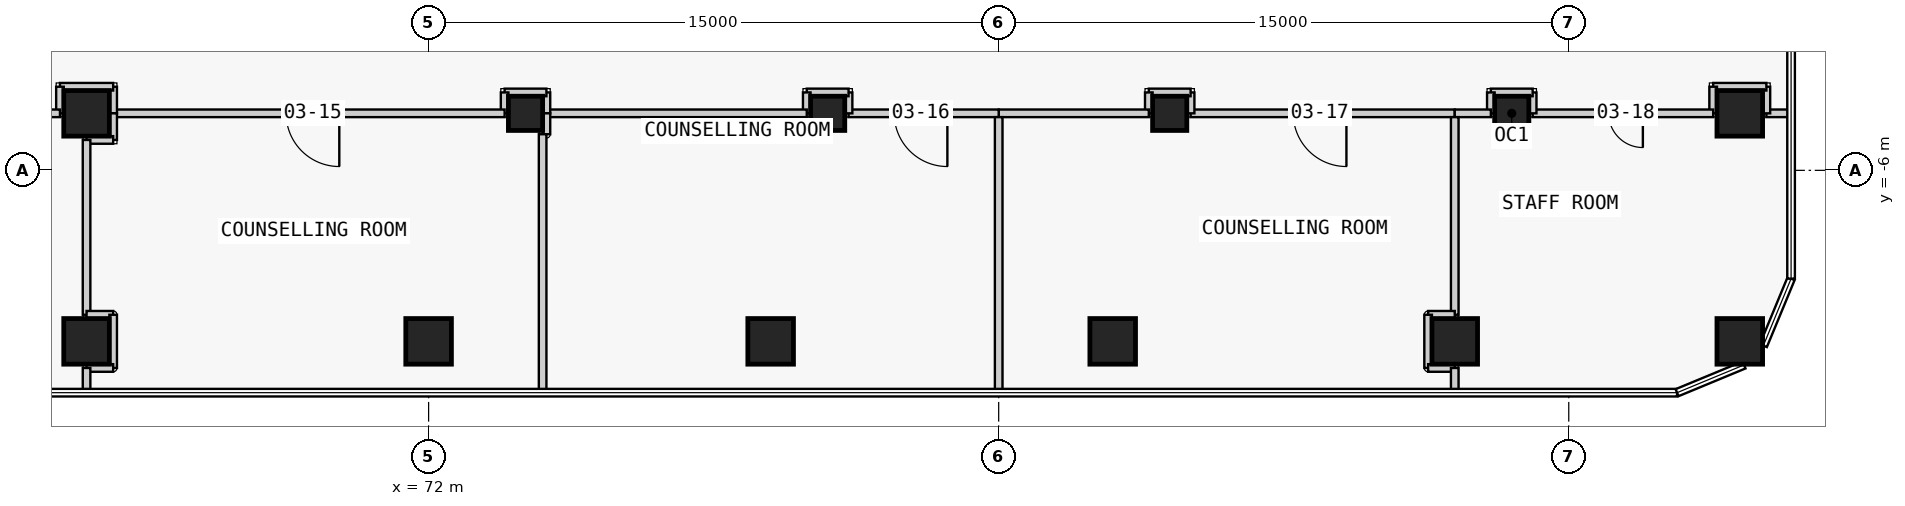
"""IFC4 building model, lengths in metres.
Left out: names, types, materials, properties, quantities, classifications, styles, units other than length and angle.
Written with IfcOpenShell. Run it as: python <this file> out.ifc"""

import sys

from ifc_helpers import new_model, si_unit, direction, frame, frame_2d, origin, origin_2d, place, context, subcontext, project, spatial, rectangle, extrude, element, fill, save


model = new_model("IFC4")
c1 = context("Model", 3, precision=1e-05, world=origin(), true_north=direction((0.0, 1.0)))
c2 = subcontext(c1, "Body", "Model", "MODEL_VIEW")
j1 = project(units=[si_unit("LENGTHUNIT", "METRE"), si_unit("PLANEANGLEUNIT", "RADIAN")], contexts=[c1])
p1 = place(None, origin())
s1 = spatial("IfcSite", under=j1, at=p1, CompositionType="ELEMENT")
p2 = place(p1, origin())
s2 = spatial("IfcBuilding", under=s1, at=p2, CompositionType="ELEMENT")
p3 = place(p2, frame((0.0, 0.0, 17.3)))
s3 = spatial("IfcBuildingStorey", under=s2, at=p3, CompositionType="ELEMENT", Elevation=17.3)
for number, where, z_axis, x_axis in (
    (1, (63.0, -10.5, 0.0), (0.0, 0.0, 1.0), (1.0, 0.0, 0.0)),
    (2, (63.0, -4.5, 0.0), (0.0, 0.0, 1.0), (1.0, 0.0, 0.0)),
    (3, (72.0, -10.5, 0.0), (0.0, 0.0, 1.0), (1.0, 0.0, 0.0)),
    (4, (81.0, -10.5, 0.0), (0.0, 0.0, 1.0), (1.0, 0.0, 0.0)),
    (5, (90.0, -10.5, 0.0), (0.0, 0.0, 1.0), (1.0, 0.0, 0.0)),
    (6, (99.0, -10.5, 0.0), (0.0, 0.0, 1.0), (1.0, 0.0, 0.0)),
    (7, (106.5, -10.5, 0.0), (0.0, 0.0, 1.0), (1.0, 0.0, 0.0)),
    (8, (106.5, -4.5, 0.0), (0.0, 0.0, 1.0), (1.0, 0.0, 0.0)),
):
    element("IfcColumn", number, at=place(p3, frame(where, z_axis=z_axis, x_axis=x_axis)), inside=s3, PredefinedType="COLUMN", context=c2, shape_type="SweptSolid", body=[
        extrude(rectangle(XDim=1.2, YDim=1.2, at=origin_2d()), origin(), (0.0, 0.0, 1.0), 4.5),
    ])
for number, where, z_axis, x_axis in (
    (9, (74.55, -4.5, 0.0), (0.0, 0.0, 1.0), (1.0, 0.0, 0.0)),
    (10, (82.5, -4.5, 0.0), (0.0, 0.0, 1.0), (1.0, 0.0, 0.0)),
    (11, (91.5, -4.5, 0.0), (0.0, 0.0, 1.0), (1.0, 0.0, 0.0)),
    (12, (100.5, -4.5, 0.0), (0.0, 0.0, 1.0), (1.0, 0.0, 0.0)),
):
    element("IfcColumn", number, at=place(p3, frame(where, z_axis=z_axis, x_axis=x_axis)), inside=s3, PredefinedType="COLUMN", context=c2, shape_type="SweptSolid", body=[
        extrude(rectangle(XDim=0.9, YDim=0.9, at=origin_2d()), origin(), (0.0, 0.0, 1.0), 4.5),
    ])
p4 = place(p3, frame((99.0, -4.5, 0.0), z_axis=(0.0, 0.0, 1.0), x_axis=(-1.0, 0.0, 0.0)))
e13 = element("IfcWall", 13, at=p4, inside=s3, PredefinedType="PARTITIONING", context=c2, shape_type="SweptSolid", body=[
    extrude(rectangle(XDim=6.95, YDim=0.2, at=frame_2d((3.475, 0.0))), origin(), (0.0, 0.0, 1.0), 4.15),
])
p5 = place(p4, frame((2.85, 0.0, 0.0)))
e14 = element("IfcOpeningElement", 14, at=p5, cuts=e13, PredefinedType="OPENING", context=c2, shape_type="SweptSolid", body=[
    extrude(rectangle(XDim=1.4, YDim=2.1, at=frame_2d((0.7, 1.05))), frame((0.0, 0.11, 0.0), z_axis=(0.0, -1.0, 0.0), x_axis=(1.0, 0.0, 0.0)), (0.0, 0.0, 1.0), 0.22),
])
p6 = place(p3, frame((92.05, -4.5, 0.0), z_axis=(0.0, 0.0, 1.0), x_axis=(0.0, 1.0, 0.0)))
e15 = element("IfcWall", 15, at=p6, inside=s3, PredefinedType="PARTITIONING", context=c2, shape_type="SweptSolid", body=[
    extrude(rectangle(XDim=0.55, YDim=0.2, at=frame_2d((0.275, 0.0))), origin(), (0.0, 0.0, 1.0), 4.15),
])
p7 = place(p3, frame((92.05, -3.95, 0.0), z_axis=(0.0, 0.0, 1.0), x_axis=(-1.0, 0.0, 0.0)))
e16 = element("IfcWall", 16, at=p7, inside=s3, PredefinedType="PARTITIONING", context=c2, shape_type="SweptSolid", body=[
    extrude(rectangle(XDim=1.1, YDim=0.2, at=frame_2d((0.55, 0.0))), origin(), (0.0, 0.0, 1.0), 4.15),
])
p8 = place(p3, frame((90.95, -3.95, 0.0), z_axis=(0.0, 0.0, 1.0), x_axis=(0.0, -1.0, 0.0)))
e17 = element("IfcWall", 17, at=p8, inside=s3, PredefinedType="PARTITIONING", context=c2, shape_type="SweptSolid", body=[
    extrude(rectangle(XDim=0.55, YDim=0.2, at=frame_2d((0.275, 0.0))), origin(), (0.0, 0.0, 1.0), 4.15),
])
p9 = place(p3, frame((90.95, -4.5, 0.0), z_axis=(0.0, 0.0, 1.0), x_axis=(-1.0, 0.0, 0.0)))
e18 = element("IfcWall", 18, at=p9, inside=s3, PredefinedType="PARTITIONING", context=c2, shape_type="SweptSolid", body=[
    extrude(rectangle(XDim=3.95, YDim=0.2, at=frame_2d((1.975, 0.0))), origin(), (0.0, 0.0, 1.0), 4.15),
])
p10 = place(p3, frame((87.0, -4.5, 0.0), z_axis=(0.0, 0.0, 1.0), x_axis=(-1.0, 0.0, 0.0)))
e19 = element("IfcWall", 19, at=p10, inside=s3, PredefinedType="PARTITIONING", context=c2, shape_type="SweptSolid", body=[
    extrude(rectangle(XDim=3.95, YDim=0.2, at=frame_2d((1.975, 0.0))), origin(), (0.0, 0.0, 1.0), 4.15),
])
p11 = place(p10, frame((1.35, 0.0, 0.0)))
e20 = element("IfcOpeningElement", 20, at=p11, cuts=e19, PredefinedType="OPENING", context=c2, shape_type="SweptSolid", body=[
    extrude(rectangle(XDim=1.4, YDim=2.1, at=frame_2d((0.7, 1.05))), frame((0.0, 0.11, 0.0), z_axis=(0.0, -1.0, 0.0), x_axis=(1.0, 0.0, 0.0)), (0.0, 0.0, 1.0), 0.22),
])
p12 = place(p3, frame((83.05, -4.5, 0.0), z_axis=(0.0, 0.0, 1.0), x_axis=(0.0, 1.0, 0.0)))
e21 = element("IfcWall", 21, at=p12, inside=s3, PredefinedType="PARTITIONING", context=c2, shape_type="SweptSolid", body=[
    extrude(rectangle(XDim=0.55, YDim=0.2, at=frame_2d((0.275, 0.0))), origin(), (0.0, 0.0, 1.0), 4.15),
])
p13 = place(p3, frame((83.05, -3.95, 0.0), z_axis=(0.0, 0.0, 1.0), x_axis=(-1.0, 0.0, 0.0)))
e22 = element("IfcWall", 22, at=p13, inside=s3, PredefinedType="PARTITIONING", context=c2, shape_type="SweptSolid", body=[
    extrude(rectangle(XDim=1.1, YDim=0.2, at=frame_2d((0.55, 0.0))), origin(), (0.0, 0.0, 1.0), 4.15),
])
p14 = place(p3, frame((81.95, -3.95, 0.0), z_axis=(0.0, 0.0, 1.0), x_axis=(0.0, -1.0, 0.0)))
e23 = element("IfcWall", 23, at=p14, inside=s3, PredefinedType="PARTITIONING", context=c2, shape_type="SweptSolid", body=[
    extrude(rectangle(XDim=0.55, YDim=0.2, at=frame_2d((0.275, 0.0))), origin(), (0.0, 0.0, 1.0), 4.15),
])
p15 = place(p3, frame((81.95, -4.5, 0.0), z_axis=(0.0, 0.0, 1.0), x_axis=(-1.0, 0.0, 0.0)))
e24 = element("IfcWall", 24, at=p15, inside=s3, PredefinedType="PARTITIONING", context=c2, shape_type="SweptSolid", body=[
    extrude(rectangle(XDim=6.85, YDim=0.2, at=frame_2d((3.425, 0.0))), origin(), (0.0, 0.0, 1.0), 4.15),
])
p16 = place(p3, frame((75.1, -4.5, 0.0), z_axis=(0.0, 0.0, 1.0), x_axis=(0.0, 1.0, 0.0)))
e25 = element("IfcWall", 25, at=p16, inside=s3, PredefinedType="PARTITIONING", context=c2, shape_type="SweptSolid", body=[
    extrude(rectangle(XDim=0.55, YDim=0.2, at=frame_2d((0.275, 0.0))), origin(), (0.0, 0.0, 1.0), 4.15),
])
p17 = place(p3, frame((75.1, -3.95, 0.0), z_axis=(0.0, 0.0, 1.0), x_axis=(-1.0, 0.0, 0.0)))
e26 = element("IfcWall", 26, at=p17, inside=s3, PredefinedType="PARTITIONING", context=c2, shape_type="SweptSolid", body=[
    extrude(rectangle(XDim=1.1, YDim=0.2, at=frame_2d((0.55, 0.0))), origin(), (0.0, 0.0, 1.0), 4.15),
])
p18 = place(p3, frame((74.0, -3.95, 0.0), z_axis=(0.0, 0.0, 1.0), x_axis=(0.0, -1.0, 0.0)))
e27 = element("IfcWall", 27, at=p18, inside=s3, PredefinedType="PARTITIONING", context=c2, shape_type="SweptSolid", body=[
    extrude(rectangle(XDim=0.55, YDim=0.2, at=frame_2d((0.275, 0.0))), origin(), (0.0, 0.0, 1.0), 4.15),
])
p19 = place(p3, frame((74.0, -4.5, 0.0), z_axis=(0.0, 0.0, 1.0), x_axis=(-1.0, 0.0, 0.0)))
e28 = element("IfcWall", 28, at=p19, inside=s3, PredefinedType="PARTITIONING", context=c2, shape_type="SweptSolid", body=[
    extrude(rectangle(XDim=10.3, YDim=0.2, at=frame_2d((5.15, 0.0))), origin(), (0.0, 0.0, 1.0), 4.15),
])
p20 = place(p19, frame((4.35, 0.0, 0.0)))
e29 = element("IfcOpeningElement", 29, at=p20, cuts=e28, PredefinedType="OPENING", context=c2, shape_type="SweptSolid", body=[
    extrude(rectangle(XDim=1.4, YDim=2.1, at=frame_2d((0.7, 1.05))), frame((0.0, 0.11, 0.0), z_axis=(0.0, -1.0, 0.0), x_axis=(1.0, 0.0, 0.0)), (0.0, 0.0, 1.0), 0.22),
])
p21 = place(p3, frame((107.85, -4.5, 0.0), z_axis=(0.0, 0.0, 1.0), x_axis=(-1.0, 0.0, 0.0)))
e30 = element("IfcWall", 30, at=p21, inside=s3, PredefinedType="PARTITIONING", context=c2, shape_type="SweptSolid", body=[
    extrude(rectangle(XDim=0.65, YDim=0.2, at=frame_2d((0.325, 0.0))), origin(), (0.0, 0.0, 1.0), 4.15),
])
p22 = place(p3, frame((107.2, -4.5, 0.0), z_axis=(0.0, 0.0, 1.0), x_axis=(0.0, 1.0, 0.0)))
e31 = element("IfcWall", 31, at=p22, inside=s3, PredefinedType="PARTITIONING", context=c2, shape_type="SweptSolid", body=[
    extrude(rectangle(XDim=0.7, YDim=0.2, at=frame_2d((0.35, 0.0))), origin(), (0.0, 0.0, 1.0), 4.15),
])
p23 = place(p3, frame((107.2, -3.8, 0.0), z_axis=(0.0, 0.0, 1.0), x_axis=(-1.0, 0.0, 0.0)))
e32 = element("IfcWall", 32, at=p23, inside=s3, PredefinedType="PARTITIONING", context=c2, shape_type="SweptSolid", body=[
    extrude(rectangle(XDim=1.4, YDim=0.2, at=frame_2d((0.7, 0.0))), origin(), (0.0, 0.0, 1.0), 4.15),
])
p24 = place(p3, frame((105.8, -3.8, 0.0), z_axis=(0.0, 0.0, 1.0), x_axis=(0.0, -1.0, 0.0)))
e33 = element("IfcWall", 33, at=p24, inside=s3, PredefinedType="PARTITIONING", context=c2, shape_type="SweptSolid", body=[
    extrude(rectangle(XDim=0.7, YDim=0.2, at=frame_2d((0.35, 0.0))), origin(), (0.0, 0.0, 1.0), 4.15),
])
p25 = place(p3, frame((105.8, -4.5, 0.0), z_axis=(0.0, 0.0, 1.0), x_axis=(-1.0, 0.0, 0.0)))
e34 = element("IfcWall", 34, at=p25, inside=s3, PredefinedType="PARTITIONING", context=c2, shape_type="SweptSolid", body=[
    extrude(rectangle(XDim=4.75, YDim=0.2, at=frame_2d((2.375, 0.0))), origin(), (0.0, 0.0, 1.0), 4.15),
])
p26 = place(p25, frame((1.85, 0.0, 0.0)))
e35 = element("IfcOpeningElement", 35, at=p26, cuts=e34, PredefinedType="OPENING", context=c2, shape_type="SweptSolid", body=[
    extrude(rectangle(XDim=0.9, YDim=2.1, at=frame_2d((0.45, 1.05))), frame((0.0, 0.11, 0.0), z_axis=(0.0, -1.0, 0.0), x_axis=(1.0, 0.0, 0.0)), (0.0, 0.0, 1.0), 0.22),
])
p27 = place(p3, frame((101.05, -4.5, 0.0), z_axis=(0.0, 0.0, 1.0), x_axis=(0.0, 1.0, 0.0)))
e36 = element("IfcWall", 36, at=p27, inside=s3, PredefinedType="PARTITIONING", context=c2, shape_type="SweptSolid", body=[
    extrude(rectangle(XDim=0.55, YDim=0.2, at=frame_2d((0.275, 0.0))), origin(), (0.0, 0.0, 1.0), 4.15),
])
p28 = place(p3, frame((101.05, -3.95, 0.0), z_axis=(0.0, 0.0, 1.0), x_axis=(-1.0, 0.0, 0.0)))
e37 = element("IfcWall", 37, at=p28, inside=s3, PredefinedType="PARTITIONING", context=c2, shape_type="SweptSolid", body=[
    extrude(rectangle(XDim=1.1, YDim=0.2, at=frame_2d((0.55, 0.0))), origin(), (0.0, 0.0, 1.0), 4.15),
])
p29 = place(p3, frame((99.95, -3.95, 0.0), z_axis=(0.0, 0.0, 1.0), x_axis=(0.0, -1.0, 0.0)))
e38 = element("IfcWall", 38, at=p29, inside=s3, PredefinedType="PARTITIONING", context=c2, shape_type="SweptSolid", body=[
    extrude(rectangle(XDim=0.55, YDim=0.2, at=frame_2d((0.275, 0.0))), origin(), (0.0, 0.0, 1.0), 4.15),
])
p30 = place(p3, frame((99.95, -4.5, 0.0), z_axis=(0.0, 0.0, 1.0), x_axis=(-1.0, 0.0, 0.0)))
e39 = element("IfcWall", 39, at=p30, inside=s3, PredefinedType="PARTITIONING", context=c2, shape_type="SweptSolid", body=[
    extrude(rectangle(XDim=0.95, YDim=0.2, at=frame_2d((0.475, 0.0))), origin(), (0.0, 0.0, 1.0), 4.15),
])
p31 = place(p3, frame((63.7, -4.5, 0.0), z_axis=(0.0, 0.0, 1.0), x_axis=(0.0, 1.0, 0.0)))
e40 = element("IfcWall", 40, at=p31, inside=s3, PredefinedType="PARTITIONING", context=c2, shape_type="SweptSolid", body=[
    extrude(rectangle(XDim=0.7, YDim=0.2, at=frame_2d((0.35, 0.0))), origin(), (0.0, 0.0, 1.0), 4.15),
])
p32 = place(p3, frame((63.7, -3.8, 0.0), z_axis=(0.0, 0.0, 1.0), x_axis=(-1.0, 0.0, 0.0)))
e41 = element("IfcWall", 41, at=p32, inside=s3, PredefinedType="PARTITIONING", context=c2, shape_type="SweptSolid", body=[
    extrude(rectangle(XDim=1.4, YDim=0.2, at=frame_2d((0.7, 0.0))), origin(), (0.0, 0.0, 1.0), 4.15),
])
p33 = place(p3, frame((62.3, -3.8, 0.0), z_axis=(0.0, 0.0, 1.0), x_axis=(0.0, -1.0, 0.0)))
e42 = element("IfcWall", 42, at=p33, inside=s3, PredefinedType="PARTITIONING", context=c2, shape_type="SweptSolid", body=[
    extrude(rectangle(XDim=0.7, YDim=0.2, at=frame_2d((0.35, 0.0))), origin(), (0.0, 0.0, 1.0), 4.15),
])
p34 = place(p3, frame((62.3, -4.5, 0.0), z_axis=(0.0, 0.0, 1.0), x_axis=(-1.0, 0.0, 0.0)))
e43 = element("IfcWall", 43, at=p34, inside=s3, PredefinedType="PARTITIONING", context=c2, shape_type="SweptSolid", body=[
    extrude(rectangle(XDim=7.6, YDim=0.2, at=frame_2d((3.8, 0.0))), origin(), (0.0, 0.0, 1.0), 4.15),
])
p35 = place(p34, frame((3.1, 0.0, 0.0)))
e44 = element("IfcOpeningElement", 44, at=p35, cuts=e43, PredefinedType="OPENING", context=c2, shape_type="SweptSolid", body=[
    extrude(rectangle(XDim=1.4, YDim=2.1, at=frame_2d((0.7, 1.05))), frame((0.0, 0.11, 0.0), z_axis=(0.0, -1.0, 0.0), x_axis=(1.0, 0.0, 0.0)), (0.0, 0.0, 1.0), 0.22),
])
for number, where, z_axis, x_axis in (
    (45, (63.7, -4.5, 0.0), (0.0, 0.0, 1.0), (0.0, -1.0, 0.0)),
    (46, (63.7, -5.2, 0.0), (0.0, 0.0, 1.0), (-1.0, 0.0, 0.0)),
):
    element("IfcWall", number, at=place(p3, frame(where, z_axis=z_axis, x_axis=x_axis)), inside=s3, PredefinedType="PARTITIONING", context=c2, shape_type="SweptSolid", body=[
        extrude(rectangle(XDim=0.7, YDim=0.2, at=frame_2d((0.35, 0.0))), origin(), (0.0, 0.0, 1.0), 4.15),
    ])
p36 = place(p3, frame((63.0, -5.2, 0.0), z_axis=(0.0, 0.0, 1.0), x_axis=(0.0, -1.0, 0.0)))
e47 = element("IfcWall", 47, at=p36, inside=s3, PredefinedType="PARTITIONING", context=c2, shape_type="SweptSolid", body=[
    extrude(rectangle(XDim=4.6, YDim=0.2, at=frame_2d((2.3, 0.0))), origin(), (0.0, 0.0, 1.0), 4.15),
])
p37 = place(p3, frame((63.0, -9.8, 0.0), z_axis=(0.0, 0.0, 1.0), x_axis=(1.0, 0.0, 0.0)))
e48 = element("IfcWall", 48, at=p37, inside=s3, PredefinedType="PARTITIONING", context=c2, shape_type="SweptSolid", body=[
    extrude(rectangle(XDim=0.7, YDim=0.2, at=frame_2d((0.35, 0.0))), origin(), (0.0, 0.0, 1.0), 4.15),
])
p38 = place(p3, frame((63.7, -9.8, 0.0), z_axis=(0.0, 0.0, 1.0), x_axis=(0.0, -1.0, 0.0)))
e49 = element("IfcWall", 49, at=p38, inside=s3, PredefinedType="PARTITIONING", context=c2, shape_type="SweptSolid", body=[
    extrude(rectangle(XDim=1.4, YDim=0.2, at=frame_2d((0.7, 0.0))), origin(), (0.0, 0.0, 1.0), 4.15),
])
p39 = place(p3, frame((63.7, -11.2, 0.0), z_axis=(0.0, 0.0, 1.0), x_axis=(-1.0, 0.0, 0.0)))
e50 = element("IfcWall", 50, at=p39, inside=s3, PredefinedType="PARTITIONING", context=c2, shape_type="SweptSolid", body=[
    extrude(rectangle(XDim=0.7, YDim=0.2, at=frame_2d((0.35, 0.0))), origin(), (0.0, 0.0, 1.0), 4.15),
])
p40 = place(p3, frame((63.0, -11.2, 0.0), z_axis=(0.0, 0.0, 1.0), x_axis=(0.0, -1.0, 0.0)))
e51 = element("IfcWall", 51, at=p40, inside=s3, PredefinedType="PARTITIONING", context=c2, shape_type="SweptSolid", body=[
    extrude(rectangle(XDim=0.65, YDim=0.2, at=frame_2d((0.325, 0.0))), origin(), (0.0, 0.0, 1.0), 4.15),
])
p41 = place(p3, frame((99.0, -4.6, 0.0), z_axis=(0.0, 0.0, 1.0), x_axis=(0.0, -1.0, 0.0)))
e52 = element("IfcWall", 52, at=p41, inside=s3, PredefinedType="PARTITIONING", context=c2, shape_type="SweptSolid", body=[
    extrude(rectangle(XDim=5.2, YDim=0.2, at=frame_2d((2.6, 0.0))), origin(), (0.0, 0.0, 1.0), 4.15),
])
p42 = place(p3, frame((99.0, -9.8, 0.0), z_axis=(0.0, 0.0, 1.0), x_axis=(-1.0, 0.0, 0.0)))
e53 = element("IfcWall", 53, at=p42, inside=s3, PredefinedType="PARTITIONING", context=c2, shape_type="SweptSolid", body=[
    extrude(rectangle(XDim=0.7, YDim=0.2, at=frame_2d((0.35, 0.0))), origin(), (0.0, 0.0, 1.0), 4.15),
])
p43 = place(p3, frame((98.3, -9.8, 0.0), z_axis=(0.0, 0.0, 1.0), x_axis=(0.0, -1.0, 0.0)))
e54 = element("IfcWall", 54, at=p43, inside=s3, PredefinedType="PARTITIONING", context=c2, shape_type="SweptSolid", body=[
    extrude(rectangle(XDim=1.4, YDim=0.2, at=frame_2d((0.7, 0.0))), origin(), (0.0, 0.0, 1.0), 4.15),
])
p44 = place(p3, frame((98.3, -11.2, 0.0), z_axis=(0.0, 0.0, 1.0), x_axis=(1.0, 0.0, 0.0)))
e55 = element("IfcWall", 55, at=p44, inside=s3, PredefinedType="PARTITIONING", context=c2, shape_type="SweptSolid", body=[
    extrude(rectangle(XDim=0.7, YDim=0.2, at=frame_2d((0.35, 0.0))), origin(), (0.0, 0.0, 1.0), 4.15),
])
p45 = place(p3, frame((99.0, -11.2, 0.0), z_axis=(0.0, 0.0, 1.0), x_axis=(0.0, -1.0, 0.0)))
e56 = element("IfcWall", 56, at=p45, inside=s3, PredefinedType="PARTITIONING", context=c2, shape_type="SweptSolid", body=[
    extrude(rectangle(XDim=0.65, YDim=0.2, at=frame_2d((0.325, 0.0))), origin(), (0.0, 0.0, 1.0), 4.15),
])
p46 = place(p3, frame((75.1, -4.5, 0.0), z_axis=(0.0, 0.0, 1.0), x_axis=(0.0, -1.0, 0.0)))
e57 = element("IfcWall", 57, at=p46, inside=s3, PredefinedType="PARTITIONING", context=c2, shape_type="SweptSolid", body=[
    extrude(rectangle(XDim=0.55, YDim=0.2, at=frame_2d((0.275, 0.0))), origin(), (0.0, 0.0, 1.0), 4.15),
])
p47 = place(p3, frame((75.0, -5.05, 0.0), z_axis=(0.0, 0.0, 1.0), x_axis=(0.0, -1.0, 0.0)))
e58 = element("IfcWall", 58, at=p47, inside=s3, PredefinedType="PARTITIONING", context=c2, shape_type="SweptSolid", body=[
    extrude(rectangle(XDim=6.8, YDim=0.2, at=frame_2d((3.4, 0.0))), origin(), (0.0, 0.0, 1.0), 4.15),
])
p48 = place(p3, frame((87.0, -4.6, 0.0), z_axis=(0.0, 0.0, 1.0), x_axis=(0.0, -1.0, 0.0)))
e59 = element("IfcWall", 59, at=p48, inside=s3, PredefinedType="PARTITIONING", context=c2, shape_type="SweptSolid", body=[
    extrude(rectangle(XDim=7.25, YDim=0.2, at=frame_2d((3.625, 0.0))), origin(), (0.0, 0.0, 1.0), 4.15),
])
p49 = place(p20, origin())
e60 = element("IfcDoor", 60, at=p49, inside=s3, OperationType="SINGLE_SWING_LEFT", PredefinedType="DOOR", context=c2, shape_type="SweptSolid", body=[
    extrude(rectangle(XDim=1.4, YDim=2.1, at=frame_2d((0.7, 1.05))), frame((0.0, 0.025, 0.0), z_axis=(0.0, -1.0, 0.0), x_axis=(1.0, 0.0, 0.0)), (0.0, 0.0, 1.0), 0.05),
])
fill(e29, e60)
p50 = place(p11, origin())
e61 = element("IfcDoor", 61, at=p50, inside=s3, OperationType="SINGLE_SWING_LEFT", PredefinedType="DOOR", context=c2, shape_type="SweptSolid", body=[
    extrude(rectangle(XDim=1.4, YDim=2.1, at=frame_2d((0.7, 1.05))), frame((0.0, 0.025, 0.0), z_axis=(0.0, -1.0, 0.0), x_axis=(1.0, 0.0, 0.0)), (0.0, 0.0, 1.0), 0.05),
])
fill(e20, e61)
p51 = place(p5, origin())
e62 = element("IfcDoor", 62, at=p51, inside=s3, OperationType="SINGLE_SWING_LEFT", PredefinedType="DOOR", context=c2, shape_type="SweptSolid", body=[
    extrude(rectangle(XDim=1.4, YDim=2.1, at=frame_2d((0.7, 1.05))), frame((0.0, 0.025, 0.0), z_axis=(0.0, -1.0, 0.0), x_axis=(1.0, 0.0, 0.0)), (0.0, 0.0, 1.0), 0.05),
])
fill(e14, e62)
p52 = place(p26, origin())
e63 = element("IfcDoor", 63, at=p52, inside=s3, OperationType="SINGLE_SWING_LEFT", PredefinedType="DOOR", context=c2, shape_type="SweptSolid", body=[
    extrude(rectangle(XDim=0.9, YDim=2.1, at=frame_2d((0.45, 1.05))), frame((0.0, 0.025, 0.0), z_axis=(0.0, -1.0, 0.0), x_axis=(1.0, 0.0, 0.0)), (0.0, 0.0, 1.0), 0.05),
])
fill(e35, e63)
save(model, sys.argv[1])
